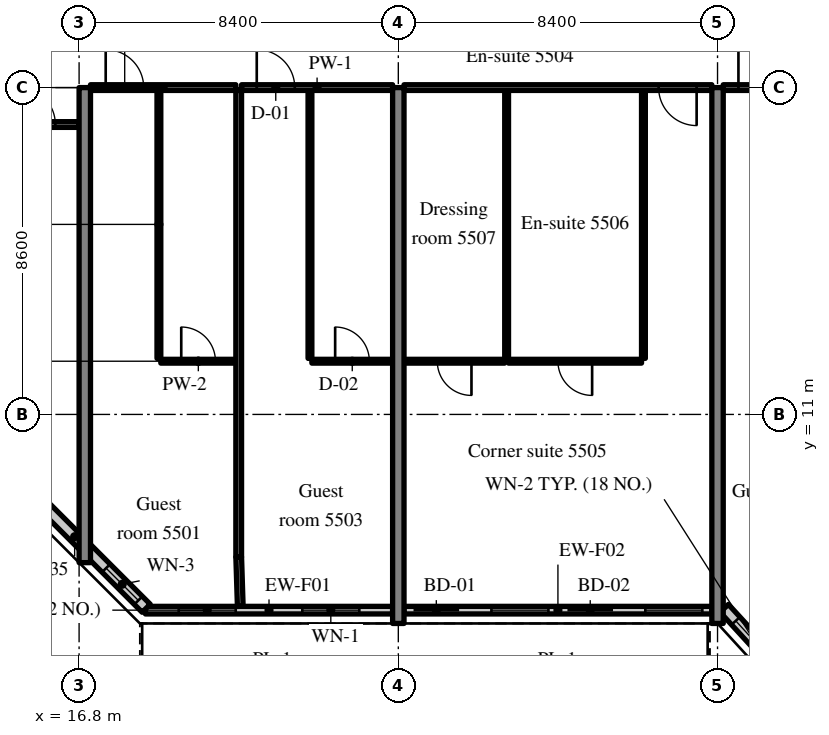
"""IFC4 building model, lengths in metres.
Left out: names, types, materials, properties, quantities, classifications, styles, units other than length and angle.
Written with IfcOpenShell. Run it as: python <this file> out.ifc"""

import sys

from ifc_helpers import new_model, si_unit, direction, frame, frame_2d, origin, place, context, subcontext, project, spatial, rectangle, extrude, source, transform, mapped, element, fill, save


model = new_model("IFC4")
c1 = context("Model", 3, precision=1e-05, world=origin(), true_north=direction((0.0, 1.0)))
c2 = subcontext(c1, "Body", "Model", "MODEL_VIEW")
j1 = project(units=[si_unit("LENGTHUNIT", "METRE"), si_unit("PLANEANGLEUNIT", "RADIAN")], contexts=[c1])
p1 = place(None, origin())
s1 = spatial("IfcSite", under=j1, at=p1, CompositionType="ELEMENT")
p2 = place(p1, origin())
s2 = spatial("IfcBuilding", under=s1, at=p2, CompositionType="ELEMENT")
p3 = place(p2, frame((0.0, 0.0, 229.6)))
s3 = spatial("IfcBuildingStorey", under=s2, at=p3, CompositionType="ELEMENT", Elevation=229.6)
m1 = source(origin(), c2, "Body", "SweptSolid", [
    extrude(rectangle(XDim=12.5, YDim=0.3, at=frame_2d((6.25, 0.0))), origin(), (0.0, 0.0, 1.0), 3.62),
])
p4 = place(p3, frame((16.95, 7.1, 0.0), z_axis=(0.0, 0.0, 1.0), x_axis=(0.0, 1.0, 0.0)))
e1 = element("IfcWall", 1, at=p4, inside=s3, PredefinedType="SHEAR", context=c2, shape_type="MappedRepresentation", body=[
    mapped(m1, transform((0.0, 0.0, 0.0), scale=1.0)),
])
m2 = source(origin(), c2, "Body", "SweptSolid", [
    extrude(rectangle(XDim=14.1, YDim=0.3, at=frame_2d((7.05, 0.0))), origin(), (0.0, 0.0, 1.0), 3.62),
])
for number, where, z_axis, x_axis in (
    (2, (25.2, 5.5, 0.0), (0.0, 0.0, 1.0), (0.0, 1.0, 0.0)),
    (3, (33.6, 5.5, 0.0), (0.0, 0.0, 1.0), (0.0, 1.0, 0.0)),
):
    element("IfcWall", number, at=place(p3, frame(where, z_axis=z_axis, x_axis=x_axis)), inside=s3, PredefinedType="SHEAR", context=c2, shape_type="MappedRepresentation", body=[
        mapped(m2, transform((0.0, 0.0, 0.0), scale=1.0)),
    ])
m3 = source(origin(), c2, "Body", "SweptSolid", [
    extrude(rectangle(XDim=6.505, YDim=0.2, at=frame_2d((3.252, 0.0))), origin(), (0.0, 0.0, 1.0), 3.02),
])
p5 = place(p3, frame((18.545, 5.85, 0.0), z_axis=(0.0, 0.0, 1.0), x_axis=(1.0, 0.0, 0.0)))
e4 = element("IfcWall", 4, at=p5, inside=s3, PredefinedType="SOLIDWALL", context=c2, shape_type="MappedRepresentation", body=[
    mapped(m3, transform((0.0, 0.0, 0.0), scale=1.0)),
])
m4 = source(origin(), c2, "Body", "SweptSolid", [
    extrude(rectangle(XDim=1.5, YDim=1.5, at=frame_2d((0.75, 0.75))), frame((0.0, 0.11, 0.0), z_axis=(0.0, -1.0, 0.0), x_axis=(1.0, 0.0, 0.0)), (0.0, 0.0, 1.0), 0.22),
])
p6 = place(p5, frame((0.876, 0.0, 0.9)))
e5 = element("IfcOpeningElement", 5, at=p6, cuts=e4, PredefinedType="OPENING", context=c2, shape_type="MappedRepresentation", body=[
    mapped(m4, transform((0.0, 0.0, 0.0), scale=1.0)),
])
p7 = place(p5, frame((4.129, 0.0, 0.9)))
e6 = element("IfcOpeningElement", 6, at=p7, cuts=e4, PredefinedType="OPENING", context=c2, shape_type="MappedRepresentation", body=[
    mapped(m4, transform((0.0, 0.0, 0.0), scale=1.0)),
])
m5 = source(origin(), c2, "Body", "SweptSolid", [
    extrude(rectangle(XDim=8.1, YDim=0.2, at=frame_2d((4.05, 0.0))), origin(), (0.0, 0.0, 1.0), 3.02),
])
p8 = place(p3, frame((25.35, 5.85, 0.0), z_axis=(0.0, 0.0, 1.0), x_axis=(1.0, 0.0, 0.0)))
e7 = element("IfcWall", 7, at=p8, inside=s3, PredefinedType="SOLIDWALL", context=c2, shape_type="MappedRepresentation", body=[
    mapped(m5, transform((0.0, 0.0, 0.0), scale=1.0)),
])
m6 = source(origin(), c2, "Body", "SweptSolid", [
    extrude(rectangle(XDim=1.2, YDim=2.4, at=frame_2d((0.6, 1.2))), frame((0.0, 0.11, 0.0), z_axis=(0.0, -1.0, 0.0), x_axis=(1.0, 0.0, 0.0)), (0.0, 0.0, 1.0), 0.22),
])
p9 = place(p8, frame((0.25, 0.0, 0.0)))
e8 = element("IfcOpeningElement", 8, at=p9, cuts=e7, PredefinedType="OPENING", context=c2, shape_type="MappedRepresentation", body=[
    mapped(m6, transform((0.0, 0.0, 0.0), scale=1.0)),
])
p10 = place(p8, frame((2.3, 0.0, 0.9)))
e9 = element("IfcOpeningElement", 9, at=p10, cuts=e7, PredefinedType="OPENING", context=c2, shape_type="MappedRepresentation", body=[
    mapped(m4, transform((0.0, 0.0, 0.0), scale=1.0)),
])
p11 = place(p8, frame((4.3, 0.0, 0.0)))
e10 = element("IfcOpeningElement", 10, at=p11, cuts=e7, PredefinedType="OPENING", context=c2, shape_type="MappedRepresentation", body=[
    mapped(m6, transform((0.0, 0.0, 0.0), scale=1.0)),
])
p12 = place(p8, frame((6.35, 0.0, 0.9)))
e11 = element("IfcOpeningElement", 11, at=p12, cuts=e7, PredefinedType="OPENING", context=c2, shape_type="MappedRepresentation", body=[
    mapped(m4, transform((0.0, 0.0, 0.0), scale=1.0)),
])
m7 = source(origin(), c2, "Body", "SweptSolid", [
    extrude(rectangle(XDim=2.398, YDim=0.3, at=frame_2d((1.199, 0.0))), origin(), (0.0, 0.0, 1.0), 3.62),
])
p13 = place(p3, frame((33.776, 5.9, 0.0), z_axis=(0.0, 0.0, 1.0), x_axis=(0.675374189419, -0.737475222815, 0.0)))
e12 = element("IfcWall", 12, at=p13, inside=s3, PredefinedType="SOLIDWALL", context=c2, shape_type="MappedRepresentation", body=[
    mapped(m7, transform((0.0, 0.0, 0.0), scale=1.0)),
])
m8 = source(origin(), c2, "Body", "SweptSolid", [
    extrude(rectangle(XDim=1.5, YDim=2.0, at=frame_2d((0.75, 1.0))), frame((0.0, 0.16, 0.0), z_axis=(0.0, -1.0, 0.0), x_axis=(1.0, 0.0, 0.0)), (0.0, 0.0, 1.0), 0.32),
])
p14 = place(p13, frame((0.449, 0.0, 0.9)))
e13 = element("IfcOpeningElement", 13, at=p14, cuts=e12, PredefinedType="OPENING", context=c2, shape_type="MappedRepresentation", body=[
    mapped(m8, transform((0.0, 0.0, 0.0), scale=1.0)),
])
m9 = source(origin(), c2, "Body", "SweptSolid", [
    extrude(rectangle(XDim=5.326, YDim=0.3, at=frame_2d((2.663, 0.0))), origin(), (0.0, 0.0, 1.0), 3.62),
])
p15 = place(p3, frame((14.8, 9.666, 0.0), z_axis=(0.0, 0.0, 1.0), x_axis=(0.707083859269, -0.707129702361, 0.0)))
e14 = element("IfcWall", 14, at=p15, inside=s3, PredefinedType="SOLIDWALL", context=c2, shape_type="MappedRepresentation", body=[
    mapped(m9, transform((0.0, 0.0, 0.0), scale=1.0)),
])
m10 = source(origin(), c2, "Body", "SweptSolid", [
    extrude(rectangle(XDim=1.2, YDim=1.5, at=frame_2d((0.6, 0.75))), frame((0.0, 0.16, 0.0), z_axis=(0.0, -1.0, 0.0), x_axis=(1.0, 0.0, 0.0)), (0.0, 0.0, 1.0), 0.32),
])
p16 = place(p15, frame((3.833, 0.0, 0.9)))
e15 = element("IfcOpeningElement", 15, at=p16, cuts=e14, PredefinedType="OPENING", context=c2, shape_type="MappedRepresentation", body=[
    mapped(m10, transform((0.0, 0.0, 0.0), scale=1.0)),
])
m11 = source(origin(), c2, "Body", "SweptSolid", [
    extrude(rectangle(XDim=7.05, YDim=0.1, at=frame_2d((3.525, 0.0))), origin(), (0.0, 0.0, 1.0), 3.62),
])
p17 = place(p3, frame((18.9, 12.475, 0.0), z_axis=(0.0, 0.0, 1.0), x_axis=(0.0, 1.0, 0.0)))
e16 = element("IfcWall", 16, at=p17, inside=s3, PredefinedType="PARTITIONING", context=c2, shape_type="MappedRepresentation", body=[
    mapped(m11, transform((0.0, 0.0, 0.0), scale=1.0)),
])
m12 = source(origin(), c2, "Body", "SweptSolid", [
    extrude(rectangle(XDim=1.975, YDim=0.1, at=frame_2d((0.988, 0.0))), origin(), (0.0, 0.0, 1.0), 3.62),
])
p18 = place(p3, frame((18.95, 12.4, 0.0), z_axis=(0.0, 0.0, 1.0), x_axis=(1.0, 0.0, 0.0)))
e17 = element("IfcWall", 17, at=p18, inside=s3, PredefinedType="PARTITIONING", context=c2, shape_type="MappedRepresentation", body=[
    mapped(m12, transform((0.0, 0.0, 0.0), scale=1.0)),
])
m13 = source(origin(), c2, "Body", "SweptSolid", [
    extrude(rectangle(XDim=0.9, YDim=2.1, at=frame_2d((0.45, 1.05))), frame((0.0, 0.06, 0.0), z_axis=(0.0, -1.0, 0.0), x_axis=(1.0, 0.0, 0.0)), (0.0, 0.0, 1.0), 0.12),
])
p19 = place(p18, frame((0.538, 0.0, 0.0)))
e18 = element("IfcOpeningElement", 18, at=p19, cuts=e17, PredefinedType="OPENING", context=c2, shape_type="MappedRepresentation", body=[
    mapped(m13, transform((0.0, 0.0, 0.0), scale=1.0)),
])
m14 = source(origin(), c2, "Body", "SweptSolid", [
    extrude(rectangle(XDim=3.825, YDim=0.15, at=frame_2d((1.913, 0.0))), origin(), (0.0, 0.0, 1.0), 2.92),
])
p20 = place(p3, frame((17.1, 19.6, 0.0), z_axis=(0.0, 0.0, 1.0), x_axis=(1.0, 0.0, 0.0)))
e19 = element("IfcWall", 19, at=p20, inside=s3, PredefinedType="PARTITIONING", context=c2, shape_type="MappedRepresentation", body=[
    mapped(m14, transform((0.0, 0.0, 0.0), scale=1.0)),
])
m15 = source(origin(), c2, "Body", "SweptSolid", [
    extrude(rectangle(XDim=1.0, YDim=2.1, at=frame_2d((0.5, 1.05))), frame((0.0, 0.085, 0.0), z_axis=(0.0, -1.0, 0.0), x_axis=(1.0, 0.0, 0.0)), (0.0, 0.0, 1.0), 0.17),
])
p21 = place(p20, frame((0.4, 0.0, 0.0)))
e20 = element("IfcOpeningElement", 20, at=p21, cuts=e19, PredefinedType="OPENING", context=c2, shape_type="MappedRepresentation", body=[
    mapped(m15, transform((0.0, 0.0, 0.0), scale=1.0)),
])
p22 = place(p3, frame((22.875, 12.475, 0.0), z_axis=(0.0, 0.0, 1.0), x_axis=(0.0, 1.0, 0.0)))
e21 = element("IfcWall", 21, at=p22, inside=s3, PredefinedType="PARTITIONING", context=c2, shape_type="MappedRepresentation", body=[
    mapped(m11, transform((0.0, 0.0, 0.0), scale=1.0)),
])
m16 = source(origin(), c2, "Body", "SweptSolid", [
    extrude(rectangle(XDim=2.125, YDim=0.1, at=frame_2d((1.062, 0.0))), origin(), (0.0, 0.0, 1.0), 3.62),
])
p23 = place(p3, frame((22.925, 12.4, 0.0), z_axis=(0.0, 0.0, 1.0), x_axis=(1.0, 0.0, 0.0)))
e22 = element("IfcWall", 22, at=p23, inside=s3, PredefinedType="PARTITIONING", context=c2, shape_type="MappedRepresentation", body=[
    mapped(m16, transform((0.0, 0.0, 0.0), scale=1.0)),
])
p24 = place(p23, frame((0.613, 0.0, 0.0)))
e23 = element("IfcOpeningElement", 23, at=p24, cuts=e22, PredefinedType="OPENING", context=c2, shape_type="MappedRepresentation", body=[
    mapped(m13, transform((0.0, 0.0, 0.0), scale=1.0)),
])
m17 = source(origin(), c2, "Body", "SweptSolid", [
    extrude(rectangle(XDim=3.975, YDim=0.15, at=frame_2d((1.988, 0.0))), origin(), (0.0, 0.0, 1.0), 2.92),
])
p25 = place(p3, frame((21.075, 19.6, 0.0), z_axis=(0.0, 0.0, 1.0), x_axis=(1.0, 0.0, 0.0)))
e24 = element("IfcWall", 24, at=p25, inside=s3, PredefinedType="PARTITIONING", context=c2, shape_type="MappedRepresentation", body=[
    mapped(m17, transform((0.0, 0.0, 0.0), scale=1.0)),
])
p26 = place(p25, frame((0.4, 0.0, 0.0)))
e25 = element("IfcOpeningElement", 25, at=p26, cuts=e24, PredefinedType="OPENING", context=c2, shape_type="MappedRepresentation", body=[
    mapped(m15, transform((0.0, 0.0, 0.0), scale=1.0)),
])
m18 = source(origin(), c2, "Body", "SweptSolid", [
    extrude(rectangle(XDim=12.275, YDim=0.15, at=frame_2d((6.137, 0.0))), origin(), (0.0, 0.0, 1.0), 3.62),
])
p27 = place(p3, frame((21.0, 7.25, 0.0), z_axis=(0.0, 0.0, 1.0), x_axis=(0.0, 1.0, 0.0)))
e26 = element("IfcWall", 26, at=p27, inside=s3, PredefinedType="PARTITIONING", context=c2, shape_type="MappedRepresentation", body=[
    mapped(m18, transform((0.0, 0.0, 0.0), scale=1.0)),
])
for number, where, z_axis, x_axis in (
    (27, (31.65, 12.475, 0.0), (0.0, 0.0, 1.0), (0.0, 1.0, 0.0)),
    (28, (28.05, 12.475, 0.0), (0.0, 0.0, 1.0), (0.0, 1.0, 0.0)),
):
    element("IfcWall", number, at=place(p3, frame(where, z_axis=z_axis, x_axis=x_axis)), inside=s3, PredefinedType="PARTITIONING", context=c2, shape_type="MappedRepresentation", body=[
        mapped(m11, transform((0.0, 0.0, 0.0), scale=1.0)),
    ])
m19 = source(origin(), c2, "Body", "SweptSolid", [
    extrude(rectangle(XDim=3.5, YDim=0.1, at=frame_2d((1.75, 0.0))), origin(), (0.0, 0.0, 1.0), 3.62),
])
p28 = place(p3, frame((28.1, 12.4, 0.0), z_axis=(0.0, 0.0, 1.0), x_axis=(1.0, 0.0, 0.0)))
e29 = element("IfcWall", 29, at=p28, inside=s3, PredefinedType="PARTITIONING", context=c2, shape_type="MappedRepresentation", body=[
    mapped(m19, transform((0.0, 0.0, 0.0), scale=1.0)),
])
p29 = place(p28, frame((1.3, 0.0, 0.0)))
e30 = element("IfcOpeningElement", 30, at=p29, cuts=e29, PredefinedType="OPENING", context=c2, shape_type="MappedRepresentation", body=[
    mapped(m13, transform((0.0, 0.0, 0.0), scale=1.0)),
])
m20 = source(origin(), c2, "Body", "SweptSolid", [
    extrude(rectangle(XDim=2.65, YDim=0.1, at=frame_2d((1.325, 0.0))), origin(), (0.0, 0.0, 1.0), 3.62),
])
p30 = place(p3, frame((25.35, 12.4, 0.0), z_axis=(0.0, 0.0, 1.0), x_axis=(1.0, 0.0, 0.0)))
e31 = element("IfcWall", 31, at=p30, inside=s3, PredefinedType="PARTITIONING", context=c2, shape_type="MappedRepresentation", body=[
    mapped(m20, transform((0.0, 0.0, 0.0), scale=1.0)),
])
p31 = place(p30, frame((0.875, 0.0, 0.0)))
e32 = element("IfcOpeningElement", 32, at=p31, cuts=e31, PredefinedType="OPENING", context=c2, shape_type="MappedRepresentation", body=[
    mapped(m13, transform((0.0, 0.0, 0.0), scale=1.0)),
])
m21 = source(origin(), c2, "Body", "SweptSolid", [
    extrude(rectangle(XDim=8.1, YDim=0.15, at=frame_2d((4.05, 0.0))), origin(), (0.0, 0.0, 1.0), 2.92),
])
p32 = place(p3, frame((25.35, 19.6, 0.0), z_axis=(0.0, 0.0, 1.0), x_axis=(1.0, 0.0, 0.0)))
e33 = element("IfcWall", 33, at=p32, inside=s3, PredefinedType="PARTITIONING", context=c2, shape_type="MappedRepresentation", body=[
    mapped(m21, transform((0.0, 0.0, 0.0), scale=1.0)),
])
p33 = place(p32, frame((6.7, 0.0, 0.0)))
e34 = element("IfcOpeningElement", 34, at=p33, cuts=e33, PredefinedType="OPENING", context=c2, shape_type="MappedRepresentation", body=[
    mapped(m15, transform((0.0, 0.0, 0.0), scale=1.0)),
])
p34 = place(p3, frame((33.75, 19.6, 0.0), z_axis=(0.0, 0.0, 1.0), x_axis=(1.0, 0.0, 0.0)))
e35 = element("IfcWall", 35, at=p34, inside=s3, PredefinedType="PARTITIONING", context=c2, shape_type="MappedRepresentation", body=[
    mapped(m17, transform((0.0, 0.0, 0.0), scale=1.0)),
])
p35 = place(p34, frame((0.4, 0.0, 0.0)))
e36 = element("IfcOpeningElement", 36, at=p35, cuts=e35, PredefinedType="OPENING", context=c2, shape_type="MappedRepresentation", body=[
    mapped(m15, transform((0.0, 0.0, 0.0), scale=1.0)),
])
m22 = source(origin(), c2, "Body", "SweptSolid", [
    extrude(rectangle(XDim=1.9, YDim=0.15, at=frame_2d((0.95, 0.0))), origin(), (0.0, 0.0, 1.0), 2.92),
])
p36 = place(p3, frame((14.9, 18.628, 0.0), z_axis=(0.0, 0.0, 1.0), x_axis=(1.0, 0.0, 0.0)))
e37 = element("IfcWall", 37, at=p36, inside=s3, PredefinedType="PARTITIONING", context=c2, shape_type="MappedRepresentation", body=[
    mapped(m22, transform((0.0, 0.0, 0.0), scale=1.0)),
])
p37 = place(p36, frame((0.275, 0.0, 0.0)))
e38 = element("IfcOpeningElement", 38, at=p37, cuts=e37, PredefinedType="OPENING", context=c2, shape_type="MappedRepresentation", body=[
    mapped(m15, transform((0.0, 0.0, 0.0), scale=1.0)),
])
m23 = source(origin(), c2, "Body", "SweptSolid", [
    extrude(rectangle(XDim=1.301, YDim=0.15, at=frame_2d((0.65, 0.0))), origin(), (0.0, 0.0, 1.0), 3.62),
])
p38 = place(p3, frame((21.041, 5.95, 0.0), z_axis=(0.0, 0.0, 1.0), x_axis=(-0.031533606063, 0.999502692187, 0.0)))
e39 = element("IfcWall", 39, at=p38, inside=s3, PredefinedType="PARTITIONING", context=c2, shape_type="MappedRepresentation", body=[
    mapped(m23, transform((0.0, 0.0, 0.0), scale=1.0)),
])
m24 = source(origin(), c2, "Body", "SweptSolid", [
    extrude(rectangle(XDim=1.5, YDim=1.5, at=frame_2d((0.75, 0.75))), frame((0.0, 0.03, 0.0), z_axis=(0.0, -1.0, 0.0), x_axis=(1.0, 0.0, 0.0)), (0.0, 0.0, 1.0), 0.06),
])
p39 = place(p6, origin())
e40 = element("IfcWindow", 40, at=p39, inside=s3, PartitioningType="SINGLE_PANEL", PredefinedType="WINDOW", context=c2, shape_type="MappedRepresentation", body=[
    mapped(m24, transform((0.0, 0.0, 0.0), scale=1.0)),
])
fill(e5, e40)
p40 = place(p7, origin())
e41 = element("IfcWindow", 41, at=p40, inside=s3, PartitioningType="SINGLE_PANEL", PredefinedType="WINDOW", context=c2, shape_type="MappedRepresentation", body=[
    mapped(m24, transform((0.0, 0.0, 0.0), scale=1.0)),
])
fill(e6, e41)
m25 = source(origin(), c2, "Body", "SweptSolid", [
    extrude(rectangle(XDim=1.2, YDim=2.4, at=frame_2d((0.6, 1.2))), frame((0.0, 0.025, 0.0), z_axis=(0.0, -1.0, 0.0), x_axis=(1.0, 0.0, 0.0)), (0.0, 0.0, 1.0), 0.05),
])
p41 = place(p9, origin())
e42 = element("IfcDoor", 42, at=p41, inside=s3, OperationType="SLIDING_TO_LEFT", PredefinedType="DOOR", context=c2, shape_type="MappedRepresentation", body=[
    mapped(m25, transform((0.0, 0.0, 0.0), scale=1.0)),
])
fill(e8, e42)
p42 = place(p10, origin())
e43 = element("IfcWindow", 43, at=p42, inside=s3, PartitioningType="SINGLE_PANEL", PredefinedType="WINDOW", context=c2, shape_type="MappedRepresentation", body=[
    mapped(m24, transform((0.0, 0.0, 0.0), scale=1.0)),
])
fill(e9, e43)
p43 = place(p11, origin())
e44 = element("IfcDoor", 44, at=p43, inside=s3, OperationType="SLIDING_TO_RIGHT", PredefinedType="DOOR", context=c2, shape_type="MappedRepresentation", body=[
    mapped(m25, transform((0.0, 0.0, 0.0), scale=1.0)),
])
fill(e10, e44)
p44 = place(p12, origin())
e45 = element("IfcWindow", 45, at=p44, inside=s3, PartitioningType="SINGLE_PANEL", PredefinedType="WINDOW", context=c2, shape_type="MappedRepresentation", body=[
    mapped(m24, transform((0.0, 0.0, 0.0), scale=1.0)),
])
fill(e11, e45)
m26 = source(origin(), c2, "Body", "SweptSolid", [
    extrude(rectangle(XDim=1.5, YDim=2.0, at=frame_2d((0.75, 1.0))), frame((0.0, 0.03, 0.0), z_axis=(0.0, -1.0, 0.0), x_axis=(1.0, 0.0, 0.0)), (0.0, 0.0, 1.0), 0.06),
])
p45 = place(p14, origin())
e46 = element("IfcWindow", 46, at=p45, inside=s3, PartitioningType="SINGLE_PANEL", PredefinedType="WINDOW", context=c2, shape_type="MappedRepresentation", body=[
    mapped(m26, transform((0.0, 0.0, 0.0), scale=1.0)),
])
fill(e13, e46)
m27 = source(origin(), c2, "Body", "SweptSolid", [
    extrude(rectangle(XDim=1.2, YDim=1.5, at=frame_2d((0.6, 0.75))), frame((0.0, 0.03, 0.0), z_axis=(0.0, -1.0, 0.0), x_axis=(1.0, 0.0, 0.0)), (0.0, 0.0, 1.0), 0.06),
])
p46 = place(p16, origin())
e47 = element("IfcWindow", 47, at=p46, inside=s3, PartitioningType="SINGLE_PANEL", PredefinedType="WINDOW", context=c2, shape_type="MappedRepresentation", body=[
    mapped(m27, transform((0.0, 0.0, 0.0), scale=1.0)),
])
fill(e15, e47)
m28 = source(origin(), c2, "Body", "SweptSolid", [
    extrude(rectangle(XDim=0.9, YDim=2.1, at=frame_2d((0.45, 1.05))), frame((0.0, 0.025, 0.0), z_axis=(0.0, -1.0, 0.0), x_axis=(1.0, 0.0, 0.0)), (0.0, 0.0, 1.0), 0.05),
])
p47 = place(p19, origin())
e48 = element("IfcDoor", 48, at=p47, inside=s3, OperationType="SINGLE_SWING_LEFT", PredefinedType="DOOR", context=c2, shape_type="MappedRepresentation", body=[
    mapped(m28, transform((0.0, 0.0, 0.0), scale=1.0)),
])
fill(e18, e48)
m29 = source(origin(), c2, "Body", "SweptSolid", [
    extrude(rectangle(XDim=1.0, YDim=2.1, at=frame_2d((0.5, 1.05))), frame((0.0, 0.025, 0.0), z_axis=(0.0, -1.0, 0.0), x_axis=(1.0, 0.0, 0.0)), (0.0, 0.0, 1.0), 0.05),
])
p48 = place(p21, origin())
e49 = element("IfcDoor", 49, at=p48, inside=s3, OperationType="SINGLE_SWING_LEFT", PredefinedType="DOOR", context=c2, shape_type="MappedRepresentation", body=[
    mapped(m29, transform((0.0, 0.0, 0.0), scale=1.0)),
])
fill(e20, e49)
p49 = place(p24, origin())
e50 = element("IfcDoor", 50, at=p49, inside=s3, OperationType="SINGLE_SWING_LEFT", PredefinedType="DOOR", context=c2, shape_type="MappedRepresentation", body=[
    mapped(m28, transform((0.0, 0.0, 0.0), scale=1.0)),
])
fill(e23, e50)
p50 = place(p26, origin())
e51 = element("IfcDoor", 51, at=p50, inside=s3, OperationType="SINGLE_SWING_LEFT", PredefinedType="DOOR", context=c2, shape_type="MappedRepresentation", body=[
    mapped(m29, transform((0.0, 0.0, 0.0), scale=1.0)),
])
fill(e25, e51)
p51 = place(p29, origin())
e52 = element("IfcDoor", 52, at=p51, inside=s3, OperationType="SINGLE_SWING_RIGHT", PredefinedType="DOOR", context=c2, shape_type="MappedRepresentation", body=[
    mapped(m28, transform((0.0, 0.0, 0.0), scale=1.0)),
])
fill(e30, e52)
p52 = place(p31, origin())
e53 = element("IfcDoor", 53, at=p52, inside=s3, OperationType="SINGLE_SWING_RIGHT", PredefinedType="DOOR", context=c2, shape_type="MappedRepresentation", body=[
    mapped(m28, transform((0.0, 0.0, 0.0), scale=1.0)),
])
fill(e32, e53)
p53 = place(p33, origin())
e54 = element("IfcDoor", 54, at=p53, inside=s3, OperationType="SINGLE_SWING_RIGHT", PredefinedType="DOOR", context=c2, shape_type="MappedRepresentation", body=[
    mapped(m29, transform((0.0, 0.0, 0.0), scale=1.0)),
])
fill(e34, e54)
p54 = place(p35, origin())
e55 = element("IfcDoor", 55, at=p54, inside=s3, OperationType="SINGLE_SWING_LEFT", PredefinedType="DOOR", context=c2, shape_type="MappedRepresentation", body=[
    mapped(m29, transform((0.0, 0.0, 0.0), scale=1.0)),
])
fill(e36, e55)
p55 = place(p37, origin())
e56 = element("IfcDoor", 56, at=p55, inside=s3, OperationType="SINGLE_SWING_LEFT", PredefinedType="DOOR", context=c2, shape_type="MappedRepresentation", body=[
    mapped(m29, transform((0.0, 0.0, 0.0), scale=1.0)),
])
fill(e38, e56)
save(model, sys.argv[1])
